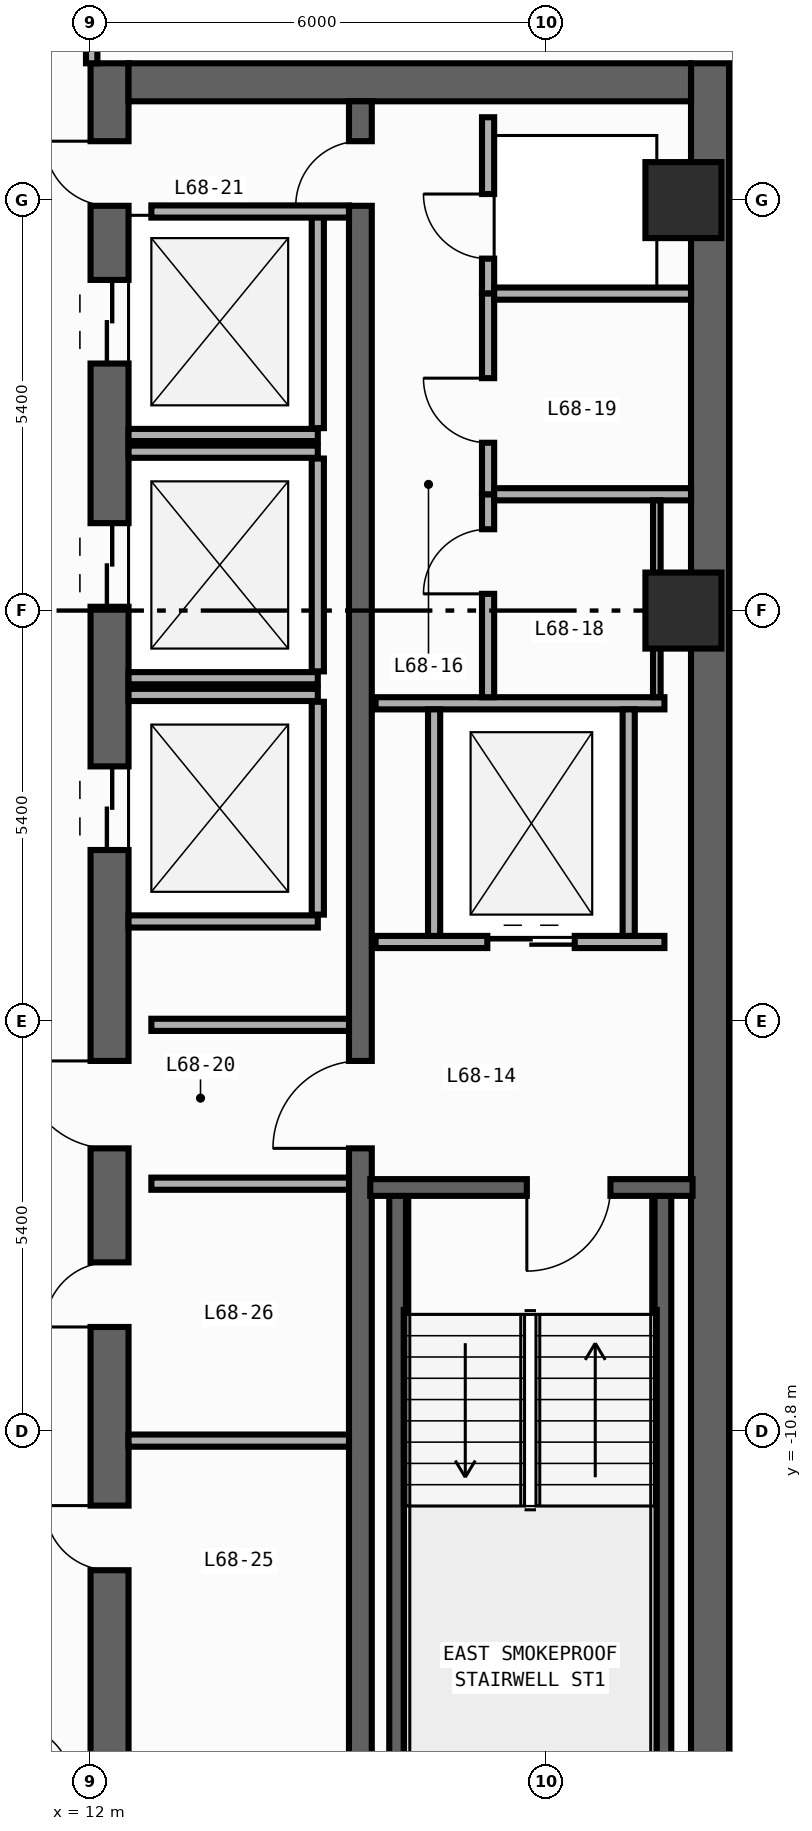
"""IFC4 building model, lengths in metres.
Left out: names, types, materials, properties, quantities, classifications, styles, units other than length and angle.
Written with IfcOpenShell. Run it as: python <this file> out.ifc"""

import sys

from ifc_helpers import new_model, si_unit, direction, frame, frame_2d, origin, origin_2d, place, context, subcontext, project, spatial, rectangle, circle, extrude, element, fill, save


model = new_model("IFC4")
c1 = context("Model", 3, precision=1e-05, world=origin(), true_north=direction((0.0, 1.0)))
c2 = subcontext(c1, "Body", "Model", "MODEL_VIEW")
j1 = project(units=[si_unit("LENGTHUNIT", "METRE"), si_unit("PLANEANGLEUNIT", "RADIAN")], contexts=[c1])
p1 = place(None, origin())
s1 = spatial("IfcSite", under=j1, at=p1, CompositionType="ELEMENT")
p2 = place(p1, origin())
s2 = spatial("IfcBuilding", under=s1, at=p2, CompositionType="ELEMENT")
p3 = place(p2, frame((0.0, 0.0, 285.2)))
s3 = spatial("IfcBuildingStorey", under=s2, at=p3, CompositionType="ELEMENT", Elevation=285.2)
p4 = place(p3, frame((12.25, -19.8, 0.0), z_axis=(0.0, 0.0, 1.0), x_axis=(0.0, 1.0, 0.0)))
e1 = element("IfcWall", 1, at=p4, inside=s3, PredefinedType="SHEAR", context=c2, shape_type="SweptSolid", body=[
    extrude(rectangle(XDim=27.0, YDim=0.5, at=frame_2d((13.5, 0.0))), origin(), (0.0, 0.0, 1.0), 3.54),
])
p5 = place(p4, frame((23.05, 0.0, 0.0)))
e2 = element("IfcOpeningElement", 2, at=p5, cuts=e1, PredefinedType="OPENING", context=c2, shape_type="SweptSolid", body=[
    extrude(rectangle(XDim=1.1, YDim=2.2, at=frame_2d((0.55, 1.1))), frame((0.0, 0.26, 0.0), z_axis=(0.0, -1.0, 0.0), x_axis=(1.0, 0.0, 0.0)), (0.0, 0.0, 1.0), 0.52),
])
p6 = place(p4, frame((19.85, 0.0, 0.0)))
e3 = element("IfcOpeningElement", 3, at=p6, cuts=e1, PredefinedType="OPENING", context=c2, shape_type="SweptSolid", body=[
    extrude(rectangle(XDim=1.1, YDim=2.2, at=frame_2d((0.55, 1.1))), frame((0.0, 0.26, 0.0), z_axis=(0.0, -1.0, 0.0), x_axis=(1.0, 0.0, 0.0)), (0.0, 0.0, 1.0), 0.52),
])
p7 = place(p4, frame((16.65, 0.0, 0.0)))
e4 = element("IfcOpeningElement", 4, at=p7, cuts=e1, PredefinedType="OPENING", context=c2, shape_type="SweptSolid", body=[
    extrude(rectangle(XDim=1.1, YDim=2.2, at=frame_2d((0.55, 1.1))), frame((0.0, 0.26, 0.0), z_axis=(0.0, -1.0, 0.0), x_axis=(1.0, 0.0, 0.0)), (0.0, 0.0, 1.0), 0.52),
])
p8 = place(p4, frame((7.175, 0.0, 0.0)))
e5 = element("IfcOpeningElement", 5, at=p8, cuts=e1, PredefinedType="OPENING", context=c2, shape_type="SweptSolid", body=[
    extrude(rectangle(XDim=0.85, YDim=2.1, at=frame_2d((0.425, 1.05))), frame((0.0, 0.26, 0.0), z_axis=(0.0, -1.0, 0.0), x_axis=(1.0, 0.0, 0.0)), (0.0, 0.0, 1.0), 0.52),
])
p9 = place(p4, frame((10.375, 0.0, 0.0)))
e6 = element("IfcOpeningElement", 6, at=p9, cuts=e1, PredefinedType="OPENING", context=c2, shape_type="SweptSolid", body=[
    extrude(rectangle(XDim=0.85, YDim=2.1, at=frame_2d((0.425, 1.05))), frame((0.0, 0.26, 0.0), z_axis=(0.0, -1.0, 0.0), x_axis=(1.0, 0.0, 0.0)), (0.0, 0.0, 1.0), 0.52),
])
p10 = place(p4, frame((12.725, 0.0, 0.0)))
e7 = element("IfcOpeningElement", 7, at=p10, cuts=e1, PredefinedType="OPENING", context=c2, shape_type="SweptSolid", body=[
    extrude(rectangle(XDim=1.15, YDim=2.2, at=frame_2d((0.575, 1.1))), frame((0.0, 0.26, 0.0), z_axis=(0.0, -1.0, 0.0), x_axis=(1.0, 0.0, 0.0)), (0.0, 0.0, 1.0), 0.52),
])
p11 = place(p4, frame((25.125, 0.0, 0.0)))
e8 = element("IfcOpeningElement", 8, at=p11, cuts=e1, PredefinedType="OPENING", context=c2, shape_type="SweptSolid", body=[
    extrude(rectangle(XDim=0.85, YDim=2.1, at=frame_2d((0.425, 1.05))), frame((0.0, 0.26, 0.0), z_axis=(0.0, -1.0, 0.0), x_axis=(1.0, 0.0, 0.0)), (0.0, 0.0, 1.0), 0.52),
])
p12 = place(p3, frame((20.15, -19.8, 0.0), z_axis=(0.0, 0.0, 1.0), x_axis=(0.0, 1.0, 0.0)))
e9 = element("IfcWall", 9, at=p12, inside=s3, PredefinedType="SHEAR", context=c2, shape_type="SweptSolid", body=[
    extrude(rectangle(XDim=27.0, YDim=0.5, at=frame_2d((13.5, 0.0))), origin(), (0.0, 0.0, 1.0), 3.54),
])
p13 = place(p3, frame((12.5, 6.95, 0.0), z_axis=(0.0, 0.0, 1.0), x_axis=(1.0, 0.0, 0.0)))
e10 = element("IfcWall", 10, at=p13, inside=s3, PredefinedType="SHEAR", context=c2, shape_type="SweptSolid", body=[
    extrude(rectangle(XDim=7.4, YDim=0.5, at=frame_2d((3.7, 0.0))), origin(), (0.0, 0.0, 1.0), 3.54),
])
p14 = place(p3, frame((15.55, -19.3, 0.0), z_axis=(0.0, 0.0, 1.0), x_axis=(0.0, 1.0, 0.0)))
e11 = element("IfcWall", 11, at=p14, inside=s3, PredefinedType="SHEAR", context=c2, shape_type="SweptSolid", body=[
    extrude(rectangle(XDim=26.0, YDim=0.3, at=frame_2d((13.0, 0.0))), origin(), (0.0, 0.0, 1.0), 3.54),
])
p15 = place(p14, frame((12.225, 0.0, 0.0)))
e12 = element("IfcOpeningElement", 12, at=p15, cuts=e11, PredefinedType="OPENING", context=c2, shape_type="SweptSolid", body=[
    extrude(rectangle(XDim=1.15, YDim=2.2, at=frame_2d((0.575, 1.1))), frame((0.0, 0.16, 0.0), z_axis=(0.0, -1.0, 0.0), x_axis=(1.0, 0.0, 0.0)), (0.0, 0.0, 1.0), 0.32),
])
p16 = place(p14, frame((24.625, 0.0, 0.0)))
e13 = element("IfcOpeningElement", 13, at=p16, cuts=e11, PredefinedType="OPENING", context=c2, shape_type="SweptSolid", body=[
    extrude(rectangle(XDim=0.85, YDim=2.1, at=frame_2d((0.425, 1.05))), frame((0.0, 0.16, 0.0), z_axis=(0.0, -1.0, 0.0), x_axis=(1.0, 0.0, 0.0)), (0.0, 0.0, 1.0), 0.32),
])
for number, where, z_axis, x_axis in (
    (14, (16.04, -19.01, 0.0), (0.0, 0.0, 1.0), (0.0, 1.0, 0.0)),
    (15, (19.53, -19.01, 0.0), (0.0, 0.0, 1.0), (0.0, 1.0, 0.0)),
):
    element("IfcWall", number, at=place(p3, frame(where, z_axis=z_axis, x_axis=x_axis)), inside=s3, PredefinedType="SHEAR", context=c2, shape_type="SweptSolid", body=[
        extrude(rectangle(XDim=11.42, YDim=0.22, at=frame_2d((5.71, 0.0))), origin(), (0.0, 0.0, 1.0), 3.54),
    ])
p17 = place(p3, frame((19.92, -7.59, 0.0), z_axis=(0.0, 0.0, 1.0), x_axis=(-1.0, 0.0, 0.0)))
e16 = element("IfcWall", 16, at=p17, inside=s3, PredefinedType="SHEAR", context=c2, shape_type="SweptSolid", body=[
    extrude(rectangle(XDim=4.24, YDim=0.22, at=frame_2d((2.12, 0.0))), origin(), (0.0, 0.0, 1.0), 3.54),
])
p18 = place(p17, frame((1.08, 0.0, 0.0)))
e17 = element("IfcOpeningElement", 17, at=p18, cuts=e16, PredefinedType="OPENING", context=c2, shape_type="SweptSolid", body=[
    extrude(rectangle(XDim=1.1, YDim=2.2, at=frame_2d((0.55, 1.1))), frame((0.0, 0.12, 0.0), z_axis=(0.0, -1.0, 0.0), x_axis=(1.0, 0.0, 0.0)), (0.0, 0.0, 1.0), 0.24),
])
for number, where, z_axis, x_axis in (
    (18, (19.8, 0.0, 0.0), (0.0, 0.0, 1.0), (1.0, 0.0, 0.0)),
    (19, (19.8, 5.4, 0.0), (0.0, 0.0, 1.0), (1.0, 0.0, 0.0)),
):
    element("IfcColumn", number, at=place(p3, frame(where, z_axis=z_axis, x_axis=x_axis)), inside=s3, PredefinedType="COLUMN", context=c2, shape_type="SweptSolid", body=[
        extrude(circle(Radius=0.5, at=origin_2d()), origin(), (0.0, 0.0, 1.0), 3.8),
    ])
p19 = place(p3, frame((12.5, 2.31, 0.0), z_axis=(0.0, 0.0, 1.0), x_axis=(1.0, 0.0, 0.0)))
e20 = element("IfcWall", 20, at=p19, inside=s3, PredefinedType="STANDARD", context=c2, shape_type="SweptSolid", body=[
    extrude(rectangle(XDim=2.49, YDim=0.16, at=frame_2d((1.245, 0.0))), origin(), (0.0, 0.0, 1.0), 3.54),
])
p20 = place(p3, frame((14.99, 2.4, 0.0), z_axis=(0.0, 0.0, 1.0), x_axis=(0.0, 1.0, 0.0)))
e21 = element("IfcWall", 21, at=p20, inside=s3, PredefinedType="STANDARD", context=c2, shape_type="SweptSolid", body=[
    extrude(rectangle(XDim=2.8, YDim=0.16, at=frame_2d((1.4, 0.0))), origin(), (0.0, 0.0, 1.0), 3.54),
])
for number, where, z_axis, x_axis in (
    (22, (12.5, -0.89, 0.0), (0.0, 0.0, 1.0), (1.0, 0.0, 0.0)),
    (23, (12.5, 2.09, 0.0), (0.0, 0.0, 1.0), (1.0, 0.0, 0.0)),
):
    element("IfcWall", number, at=place(p3, frame(where, z_axis=z_axis, x_axis=x_axis)), inside=s3, PredefinedType="STANDARD", context=c2, shape_type="SweptSolid", body=[
        extrude(rectangle(XDim=2.49, YDim=0.16, at=frame_2d((1.245, 0.0))), origin(), (0.0, 0.0, 1.0), 3.54),
    ])
p21 = place(p3, frame((14.99, -0.8, 0.0), z_axis=(0.0, 0.0, 1.0), x_axis=(0.0, 1.0, 0.0)))
e24 = element("IfcWall", 24, at=p21, inside=s3, PredefinedType="STANDARD", context=c2, shape_type="SweptSolid", body=[
    extrude(rectangle(XDim=2.8, YDim=0.16, at=frame_2d((1.4, 0.0))), origin(), (0.0, 0.0, 1.0), 3.54),
])
for number, where, z_axis, x_axis in (
    (25, (12.5, -4.09, 0.0), (0.0, 0.0, 1.0), (1.0, 0.0, 0.0)),
    (26, (12.5, -1.11, 0.0), (0.0, 0.0, 1.0), (1.0, 0.0, 0.0)),
):
    element("IfcWall", number, at=place(p3, frame(where, z_axis=z_axis, x_axis=x_axis)), inside=s3, PredefinedType="STANDARD", context=c2, shape_type="SweptSolid", body=[
        extrude(rectangle(XDim=2.49, YDim=0.16, at=frame_2d((1.245, 0.0))), origin(), (0.0, 0.0, 1.0), 3.54),
    ])
p22 = place(p3, frame((14.99, -4.0, 0.0), z_axis=(0.0, 0.0, 1.0), x_axis=(0.0, 1.0, 0.0)))
e27 = element("IfcWall", 27, at=p22, inside=s3, PredefinedType="STANDARD", context=c2, shape_type="SweptSolid", body=[
    extrude(rectangle(XDim=2.8, YDim=0.16, at=frame_2d((1.4, 0.0))), origin(), (0.0, 0.0, 1.0), 3.54),
])
p23 = place(p3, frame((15.75, -4.36, 0.0), z_axis=(0.0, 0.0, 1.0), x_axis=(1.0, 0.0, 0.0)))
e28 = element("IfcWall", 28, at=p23, inside=s3, PredefinedType="STANDARD", context=c2, shape_type="SweptSolid", body=[
    extrude(rectangle(XDim=3.8, YDim=0.16, at=frame_2d((1.9, 0.0))), origin(), (0.0, 0.0, 1.0), 3.54),
])
p24 = place(p23, frame((1.47, 0.0, 0.0)))
e29 = element("IfcOpeningElement", 29, at=p24, cuts=e28, PredefinedType="OPENING", context=c2, shape_type="SweptSolid", body=[
    extrude(rectangle(XDim=1.15, YDim=2.2, at=frame_2d((0.575, 1.1))), frame((0.0, 0.09, 0.0), z_axis=(0.0, -1.0, 0.0), x_axis=(1.0, 0.0, 0.0)), (0.0, 0.0, 1.0), 0.18),
])
p25 = place(p3, frame((15.75, -1.22, 0.0), z_axis=(0.0, 0.0, 1.0), x_axis=(1.0, 0.0, 0.0)))
e30 = element("IfcWall", 30, at=p25, inside=s3, PredefinedType="STANDARD", context=c2, shape_type="SweptSolid", body=[
    extrude(rectangle(XDim=3.8, YDim=0.16, at=frame_2d((1.9, 0.0))), origin(), (0.0, 0.0, 1.0), 3.54),
])
for number, where, z_axis, x_axis in (
    (31, (16.52, -4.28, 0.0), (0.0, 0.0, 1.0), (0.0, 1.0, 0.0)),
    (32, (19.08, -4.28, 0.0), (0.0, 0.0, 1.0), (0.0, 1.0, 0.0)),
):
    element("IfcWall", number, at=place(p3, frame(where, z_axis=z_axis, x_axis=x_axis)), inside=s3, PredefinedType="STANDARD", context=c2, shape_type="SweptSolid", body=[
        extrude(rectangle(XDim=2.98, YDim=0.16, at=frame_2d((1.49, 0.0))), origin(), (0.0, 0.0, 1.0), 3.54),
    ])
for number, where, z_axis, x_axis in (
    (33, (12.8, -5.45, 0.0), (0.0, 0.0, 1.0), (1.0, 0.0, 0.0)),
    (34, (12.8, -7.54, 0.0), (0.0, 0.0, 1.0), (1.0, 0.0, 0.0)),
    (35, (12.8, 5.25, 0.0), (0.0, 0.0, 1.0), (1.0, 0.0, 0.0)),
):
    element("IfcWall", number, at=place(p3, frame(where, z_axis=z_axis, x_axis=x_axis)), inside=s3, PredefinedType="STANDARD", context=c2, shape_type="SweptSolid", body=[
        extrude(rectangle(XDim=2.6, YDim=0.16, at=frame_2d((1.3, 0.0))), origin(), (0.0, 0.0, 1.0), 3.54),
    ])
p26 = place(p3, frame((17.23, 4.17, 0.0), z_axis=(0.0, 0.0, 1.0), x_axis=(0.0, 1.0, 0.0)))
e36 = element("IfcWall", 36, at=p26, inside=s3, PredefinedType="PARTITIONING", context=c2, shape_type="SweptSolid", body=[
    extrude(rectangle(XDim=2.32, YDim=0.16, at=frame_2d((1.16, 0.0))), origin(), (0.0, 0.0, 1.0), 3.54),
])
p27 = place(p26, frame((0.46, 0.0, 0.0)))
e37 = element("IfcOpeningElement", 37, at=p27, cuts=e36, PredefinedType="OPENING", context=c2, shape_type="SweptSolid", body=[
    extrude(rectangle(XDim=0.85, YDim=2.1, at=frame_2d((0.425, 1.05))), frame((0.0, 0.09, 0.0), z_axis=(0.0, -1.0, 0.0), x_axis=(1.0, 0.0, 0.0)), (0.0, 0.0, 1.0), 0.18),
])
p28 = place(p3, frame((17.23, -1.14, 0.0), z_axis=(0.0, 0.0, 1.0), x_axis=(0.0, 1.0, 0.0)))
e38 = element("IfcWall", 38, at=p28, inside=s3, PredefinedType="PARTITIONING", context=c2, shape_type="SweptSolid", body=[
    extrude(rectangle(XDim=2.67, YDim=0.16, at=frame_2d((1.335, 0.0))), origin(), (0.0, 0.0, 1.0), 3.54),
])
p29 = place(p28, frame((1.36, 0.0, 0.0)))
e39 = element("IfcOpeningElement", 39, at=p29, cuts=e38, PredefinedType="OPENING", context=c2, shape_type="SweptSolid", body=[
    extrude(rectangle(XDim=0.85, YDim=2.1, at=frame_2d((0.425, 1.05))), frame((0.0, 0.09, 0.0), z_axis=(0.0, -1.0, 0.0), x_axis=(1.0, 0.0, 0.0)), (0.0, 0.0, 1.0), 0.18),
])
p30 = place(p3, frame((17.23, 1.53, 0.0), z_axis=(0.0, 0.0, 1.0), x_axis=(0.0, 1.0, 0.0)))
e40 = element("IfcWall", 40, at=p30, inside=s3, PredefinedType="PARTITIONING", context=c2, shape_type="SweptSolid", body=[
    extrude(rectangle(XDim=2.64, YDim=0.16, at=frame_2d((1.32, 0.0))), origin(), (0.0, 0.0, 1.0), 3.54),
])
p31 = place(p30, frame((0.677, 0.0, 0.0)))
e41 = element("IfcOpeningElement", 41, at=p31, cuts=e40, PredefinedType="OPENING", context=c2, shape_type="SweptSolid", body=[
    extrude(rectangle(XDim=0.85, YDim=2.1, at=frame_2d((0.425, 1.05))), frame((0.0, 0.09, 0.0), z_axis=(0.0, -1.0, 0.0), x_axis=(1.0, 0.0, 0.0)), (0.0, 0.0, 1.0), 0.18),
])
for number, where, z_axis, x_axis in (
    (42, (17.31, 4.17, 0.0), (0.0, 0.0, 1.0), (1.0, 0.0, 0.0)),
    (43, (17.31, 1.53, 0.0), (0.0, 0.0, 1.0), (1.0, 0.0, 0.0)),
):
    element("IfcWall", number, at=place(p3, frame(where, z_axis=z_axis, x_axis=x_axis)), inside=s3, PredefinedType="PARTITIONING", context=c2, shape_type="SweptSolid", body=[
        extrude(rectangle(XDim=2.59, YDim=0.16, at=frame_2d((1.295, 0.0))), origin(), (0.0, 0.0, 1.0), 3.54),
    ])
p32 = place(p3, frame((12.5, -10.92, 0.0), z_axis=(0.0, 0.0, 1.0), x_axis=(1.0, 0.0, 0.0)))
e44 = element("IfcWall", 44, at=p32, inside=s3, PredefinedType="PARTITIONING", context=c2, shape_type="SweptSolid", body=[
    extrude(rectangle(XDim=2.9, YDim=0.16, at=frame_2d((1.45, 0.0))), origin(), (0.0, 0.0, 1.0), 2.64),
])
p33 = place(p3, frame((12.015, 7.2, 0.0), z_axis=(0.0, 0.0, 1.0), x_axis=(0.0, 1.0, 0.0)))
e45 = element("IfcWall", 45, at=p33, inside=s3, PredefinedType="PARTITIONING", context=c2, shape_type="SweptSolid", body=[
    extrude(rectangle(XDim=6.68, YDim=0.15, at=frame_2d((3.34, 0.0))), origin(), (0.0, 0.0, 1.0), 3.54),
])
p34 = place(p33, frame((0.67, 0.0, 0.0)))
e46 = element("IfcOpeningElement", 46, at=p34, cuts=e45, PredefinedType="OPENING", context=c2, shape_type="SweptSolid", body=[
    extrude(rectangle(XDim=0.9, YDim=2.15, at=frame_2d((0.45, 1.075))), frame((0.0, 0.085, 0.0), z_axis=(0.0, -1.0, 0.0), x_axis=(1.0, 0.0, 0.0)), (0.0, 0.0, 1.0), 0.17),
])
p35 = place(p3, frame((19.45, 1.45, 0.0), z_axis=(0.0, 0.0, 1.0), x_axis=(0.0, -1.0, 0.0)))
e47 = element("IfcWall", 47, at=p35, inside=s3, PredefinedType="PARTITIONING", context=c2, shape_type="SweptSolid", body=[
    extrude(rectangle(XDim=2.59, YDim=0.1, at=frame_2d((1.295, 0.0))), origin(), (0.0, 0.0, 1.0), 3.54),
])
p36 = place(p18, origin())
e48 = element("IfcDoor", 48, at=p36, inside=s3, OperationType="SINGLE_SWING_RIGHT", PredefinedType="DOOR", context=c2, shape_type="SweptSolid", body=[
    extrude(rectangle(XDim=1.1, YDim=2.2, at=frame_2d((0.55, 1.1))), frame((0.0, 0.025, 0.0), z_axis=(0.0, -1.0, 0.0), x_axis=(1.0, 0.0, 0.0)), (0.0, 0.0, 1.0), 0.05),
])
fill(e17, e48)
p37 = place(p5, origin())
e49 = element("IfcDoor", 49, at=p37, inside=s3, OperationType="DOUBLE_DOOR_SLIDING", PredefinedType="DOOR", context=c2, shape_type="SweptSolid", body=[
    extrude(rectangle(XDim=1.1, YDim=2.2, at=frame_2d((0.55, 1.1))), frame((0.0, 0.025, 0.0), z_axis=(0.0, -1.0, 0.0), x_axis=(1.0, 0.0, 0.0)), (0.0, 0.0, 1.0), 0.05),
])
fill(e2, e49)
p38 = place(p6, origin())
e50 = element("IfcDoor", 50, at=p38, inside=s3, OperationType="DOUBLE_DOOR_SLIDING", PredefinedType="DOOR", context=c2, shape_type="SweptSolid", body=[
    extrude(rectangle(XDim=1.1, YDim=2.2, at=frame_2d((0.55, 1.1))), frame((0.0, 0.025, 0.0), z_axis=(0.0, -1.0, 0.0), x_axis=(1.0, 0.0, 0.0)), (0.0, 0.0, 1.0), 0.05),
])
fill(e3, e50)
p39 = place(p7, origin())
e51 = element("IfcDoor", 51, at=p39, inside=s3, OperationType="DOUBLE_DOOR_SLIDING", PredefinedType="DOOR", context=c2, shape_type="SweptSolid", body=[
    extrude(rectangle(XDim=1.1, YDim=2.2, at=frame_2d((0.55, 1.1))), frame((0.0, 0.025, 0.0), z_axis=(0.0, -1.0, 0.0), x_axis=(1.0, 0.0, 0.0)), (0.0, 0.0, 1.0), 0.05),
])
fill(e4, e51)
p40 = place(p8, origin())
e52 = element("IfcDoor", 52, at=p40, inside=s3, OperationType="SINGLE_SWING_RIGHT", PredefinedType="DOOR", context=c2, shape_type="SweptSolid", body=[
    extrude(rectangle(XDim=0.85, YDim=2.1, at=frame_2d((0.425, 1.05))), frame((0.0, 0.025, 0.0), z_axis=(0.0, -1.0, 0.0), x_axis=(1.0, 0.0, 0.0)), (0.0, 0.0, 1.0), 0.05),
])
fill(e5, e52)
p41 = place(p9, origin())
e53 = element("IfcDoor", 53, at=p41, inside=s3, OperationType="SINGLE_SWING_LEFT", PredefinedType="DOOR", context=c2, shape_type="SweptSolid", body=[
    extrude(rectangle(XDim=0.85, YDim=2.1, at=frame_2d((0.425, 1.05))), frame((0.0, 0.025, 0.0), z_axis=(0.0, -1.0, 0.0), x_axis=(1.0, 0.0, 0.0)), (0.0, 0.0, 1.0), 0.05),
])
fill(e6, e53)
p42 = place(p10, origin())
e54 = element("IfcDoor", 54, at=p42, inside=s3, OperationType="SINGLE_SWING_RIGHT", PredefinedType="DOOR", context=c2, shape_type="SweptSolid", body=[
    extrude(rectangle(XDim=1.15, YDim=2.2, at=frame_2d((0.575, 1.1))), frame((0.0, 0.025, 0.0), z_axis=(0.0, -1.0, 0.0), x_axis=(1.0, 0.0, 0.0)), (0.0, 0.0, 1.0), 0.05),
])
fill(e7, e54)
p43 = place(p15, origin())
e55 = element("IfcDoor", 55, at=p43, inside=s3, OperationType="SINGLE_SWING_LEFT", PredefinedType="DOOR", context=c2, shape_type="SweptSolid", body=[
    extrude(rectangle(XDim=1.15, YDim=2.2, at=frame_2d((0.575, 1.1))), frame((0.0, 0.025, 0.0), z_axis=(0.0, -1.0, 0.0), x_axis=(1.0, 0.0, 0.0)), (0.0, 0.0, 1.0), 0.05),
])
fill(e12, e55)
p44 = place(p11, origin())
e56 = element("IfcDoor", 56, at=p44, inside=s3, OperationType="SINGLE_SWING_RIGHT", PredefinedType="DOOR", context=c2, shape_type="SweptSolid", body=[
    extrude(rectangle(XDim=0.85, YDim=2.1, at=frame_2d((0.425, 1.05))), frame((0.0, 0.025, 0.0), z_axis=(0.0, -1.0, 0.0), x_axis=(1.0, 0.0, 0.0)), (0.0, 0.0, 1.0), 0.05),
])
fill(e8, e56)
p45 = place(p16, origin())
e57 = element("IfcDoor", 57, at=p45, inside=s3, OperationType="SINGLE_SWING_LEFT", PredefinedType="DOOR", context=c2, shape_type="SweptSolid", body=[
    extrude(rectangle(XDim=0.85, YDim=2.1, at=frame_2d((0.425, 1.05))), frame((0.0, 0.025, 0.0), z_axis=(0.0, -1.0, 0.0), x_axis=(1.0, 0.0, 0.0)), (0.0, 0.0, 1.0), 0.05),
])
fill(e13, e57)
p46 = place(p24, origin())
e58 = element("IfcDoor", 58, at=p46, inside=s3, OperationType="DOUBLE_DOOR_SLIDING", PredefinedType="DOOR", context=c2, shape_type="SweptSolid", body=[
    extrude(rectangle(XDim=1.15, YDim=2.2, at=frame_2d((0.575, 1.1))), frame((0.0, 0.025, 0.0), z_axis=(0.0, -1.0, 0.0), x_axis=(1.0, 0.0, 0.0)), (0.0, 0.0, 1.0), 0.05),
])
fill(e29, e58)
p47 = place(p27, origin())
e59 = element("IfcDoor", 59, at=p47, inside=s3, OperationType="SINGLE_SWING_RIGHT", PredefinedType="DOOR", context=c2, shape_type="SweptSolid", body=[
    extrude(rectangle(XDim=0.85, YDim=2.1, at=frame_2d((0.425, 1.05))), frame((0.0, 0.025, 0.0), z_axis=(0.0, -1.0, 0.0), x_axis=(1.0, 0.0, 0.0)), (0.0, 0.0, 1.0), 0.05),
])
fill(e37, e59)
p48 = place(p29, origin())
e60 = element("IfcDoor", 60, at=p48, inside=s3, OperationType="SINGLE_SWING_LEFT", PredefinedType="DOOR", context=c2, shape_type="SweptSolid", body=[
    extrude(rectangle(XDim=0.85, YDim=2.1, at=frame_2d((0.425, 1.05))), frame((0.0, 0.025, 0.0), z_axis=(0.0, -1.0, 0.0), x_axis=(1.0, 0.0, 0.0)), (0.0, 0.0, 1.0), 0.05),
])
fill(e39, e60)
p49 = place(p31, origin())
e61 = element("IfcDoor", 61, at=p49, inside=s3, OperationType="SINGLE_SWING_RIGHT", PredefinedType="DOOR", context=c2, shape_type="SweptSolid", body=[
    extrude(rectangle(XDim=0.85, YDim=2.1, at=frame_2d((0.425, 1.05))), frame((0.0, 0.025, 0.0), z_axis=(0.0, -1.0, 0.0), x_axis=(1.0, 0.0, 0.0)), (0.0, 0.0, 1.0), 0.05),
])
fill(e41, e61)
save(model, sys.argv[1])
